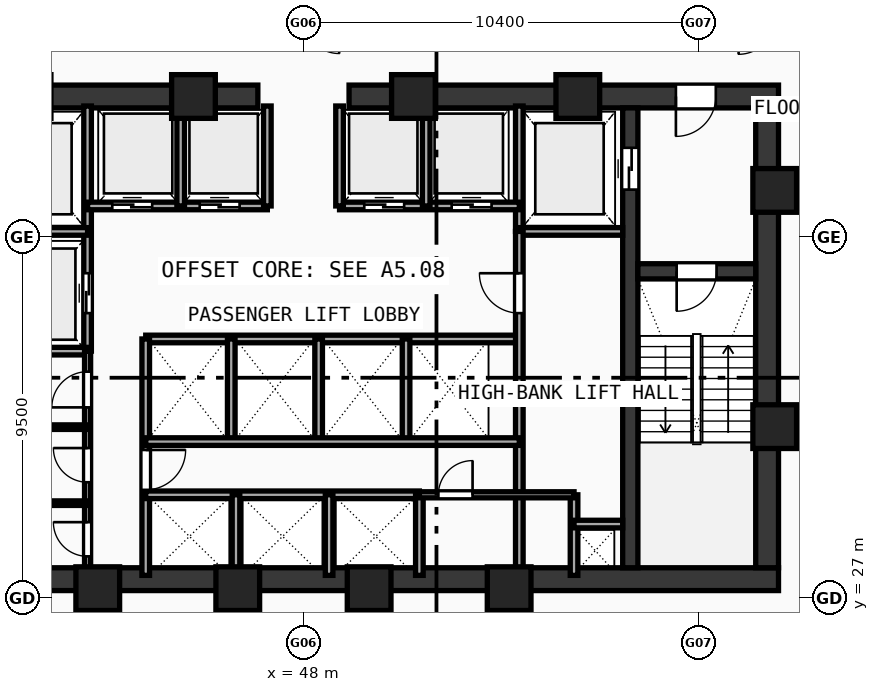
"""IFC4 building model, lengths in metres.
Left out: names, types, materials, properties, quantities, classifications, styles, units other than length and angle.
Written with IfcOpenShell. Run it as: python <this file> out.ifc"""

import sys

from ifc_helpers import new_model, si_unit, direction, frame, frame_2d, origin, origin_with_axes, origin_2d, place, context, subcontext, project, spatial, rectangle, hollow_rectangle, extrude, source, transform, mapped, element, fill, save


model = new_model("IFC4")
c1 = context("Model", 3, precision=1e-05, world=origin(), true_north=direction((0.0, 1.0)))
c2 = subcontext(c1, "Body", "Model", "MODEL_VIEW")
j1 = project(units=[si_unit("LENGTHUNIT", "METRE"), si_unit("PLANEANGLEUNIT", "RADIAN")], contexts=[c1])
p1 = place(None, origin())
s1 = spatial("IfcSite", under=j1, at=p1, CompositionType="ELEMENT")
p2 = place(p1, origin())
s2 = spatial("IfcBuilding", under=s1, at=p2, CompositionType="ELEMENT")
p3 = place(p2, frame((0.0, 0.0, 103.98)))
s3 = spatial("IfcBuildingStorey", under=s2, at=p3, CompositionType="ELEMENT", Elevation=103.98)
p4 = place(p3, frame((35.5, 27.5, 0.0), z_axis=(0.0, 0.0, 1.0), x_axis=(1.0, 0.0, 0.0)))
e1 = element("IfcWall", 1, at=p4, inside=s3, PredefinedType="SHEAR", context=c2, shape_type="SweptSolid", body=[
    extrude(rectangle(XDim=25.0, YDim=0.6, at=frame_2d((12.5, 0.0))), origin(), (0.0, 0.0, 1.0), 3.54),
])
p5 = place(p3, frame((35.5, 40.2, 0.0), z_axis=(0.0, 0.0, 1.0), x_axis=(1.0, 0.0, 0.0)))
e2 = element("IfcWall", 2, at=p5, inside=s3, PredefinedType="SHEAR", context=c2, shape_type="SweptSolid", body=[
    extrude(rectangle(XDim=11.3, YDim=0.6, at=frame_2d((5.65, 0.0))), origin(), (0.0, 0.0, 1.0), 3.54),
])
p6 = place(p5, frame((1.65, 0.0, 0.0)))
e3 = element("IfcOpeningElement", 3, at=p6, cuts=e2, PredefinedType="OPENING", context=c2, shape_type="SweptSolid", body=[
    extrude(rectangle(XDim=1.05, YDim=2.1, at=frame_2d((0.525, 1.05))), frame((0.0, 0.31, 0.0), z_axis=(0.0, -1.0, 0.0), x_axis=(1.0, 0.0, 0.0)), (0.0, 0.0, 1.0), 0.62),
])
p7 = place(p3, frame((49.2, 40.2, 0.0), z_axis=(0.0, 0.0, 1.0), x_axis=(1.0, 0.0, 0.0)))
e4 = element("IfcWall", 4, at=p7, inside=s3, PredefinedType="SHEAR", context=c2, shape_type="SweptSolid", body=[
    extrude(rectangle(XDim=11.3, YDim=0.6, at=frame_2d((5.65, 0.0))), origin(), (0.0, 0.0, 1.0), 3.54),
])
p8 = place(p7, frame((8.6, 0.0, 0.0)))
e5 = element("IfcOpeningElement", 5, at=p8, cuts=e4, PredefinedType="OPENING", context=c2, shape_type="SweptSolid", body=[
    extrude(rectangle(XDim=1.05, YDim=2.1, at=frame_2d((0.525, 1.05))), frame((0.0, 0.31, 0.0), z_axis=(0.0, -1.0, 0.0), x_axis=(1.0, 0.0, 0.0)), (0.0, 0.0, 1.0), 0.62),
])
p9 = place(p3, frame((60.2, 27.8, 0.0), z_axis=(0.0, 0.0, 1.0), x_axis=(0.0, 1.0, 0.0)))
e6 = element("IfcWall", 6, at=p9, inside=s3, PredefinedType="SHEAR", context=c2, shape_type="SweptSolid", body=[
    extrude(rectangle(XDim=12.1, YDim=0.6, at=frame_2d((6.05, 0.0))), origin(), (0.0, 0.0, 1.0), 3.54),
])
p10 = place(p3, frame((56.6, 27.8, 0.0), z_axis=(0.0, 0.0, 1.0), x_axis=(0.0, 1.0, 0.0)))
e7 = element("IfcWall", 7, at=p10, inside=s3, PredefinedType="SHEAR", context=c2, shape_type="SweptSolid", body=[
    extrude(rectangle(XDim=12.1, YDim=0.4, at=frame_2d((6.05, 0.0))), origin(), (0.0, 0.0, 1.0), 3.54),
])
p11 = place(p10, frame((9.95, 0.0, 0.0)))
e8 = element("IfcOpeningElement", 8, at=p11, cuts=e7, PredefinedType="OPENING", context=c2, shape_type="SweptSolid", body=[
    extrude(rectangle(XDim=1.1, YDim=2.1, at=frame_2d((0.55, 1.05))), frame((0.0, 0.21, 0.0), z_axis=(0.0, -1.0, 0.0), x_axis=(1.0, 0.0, 0.0)), (0.0, 0.0, 1.0), 0.42),
])
p12 = place(p3, frame((56.8, 35.6, 0.0), z_axis=(0.0, 0.0, 1.0), x_axis=(1.0, 0.0, 0.0)))
e9 = element("IfcWall", 9, at=p12, inside=s3, PredefinedType="SHEAR", context=c2, shape_type="SweptSolid", body=[
    extrude(rectangle(XDim=3.1, YDim=0.4, at=frame_2d((1.55, 0.0))), origin(), (0.0, 0.0, 1.0), 3.54),
])
p13 = place(p12, frame((1.02, 0.0, 0.0)))
e10 = element("IfcOpeningElement", 10, at=p13, cuts=e9, PredefinedType="OPENING", context=c2, shape_type="SweptSolid", body=[
    extrude(rectangle(XDim=1.05, YDim=2.1, at=frame_2d((0.525, 1.05))), frame((0.0, 0.21, 0.0), z_axis=(0.0, -1.0, 0.0), x_axis=(1.0, 0.0, 0.0)), (0.0, 0.0, 1.0), 0.42),
])
m1 = source(origin(), c2, "Body", "SweptSolid", [
    extrude(hollow_rectangle(XDim=1.15, YDim=1.15, WallThickness=0.048, at=origin_2d()), origin(), (0.0, 0.0, 1.0), 3.8),
])
for number, where, z_axis, x_axis in (
    (11, (42.588, 27.25, -0.26), (0.0, 0.0, 1.0), (1.0, 0.0, 0.0)),
    (12, (46.272, 27.25, -0.26), (0.0, 0.0, 1.0), (1.0, 0.0, 0.0)),
    (13, (49.729, 27.25, -0.26), (0.0, 0.0, 1.0), (1.0, 0.0, 0.0)),
    (14, (53.412, 27.25, -0.26), (0.0, 0.0, 1.0), (1.0, 0.0, 0.0)),
    (15, (60.4, 31.513, -0.26), (0.0, 0.0, 1.0), (1.0, 0.0, 0.0)),
    (16, (60.4, 37.729, -0.26), (0.0, 0.0, 1.0), (1.0, 0.0, 0.0)),
    (17, (55.219, 40.2, -0.26), (0.0, 0.0, 1.0), (1.0, 0.0, 0.0)),
    (18, (50.894, 40.2, -0.26), (0.0, 0.0, 1.0), (1.0, 0.0, 0.0)),
    (19, (45.106, 40.2, -0.26), (0.0, 0.0, 1.0), (1.0, 0.0, 0.0)),
):
    element("IfcColumn", number, at=place(p3, frame(where, z_axis=z_axis, x_axis=x_axis)), inside=s3, PredefinedType="COLUMN", context=c2, shape_type="MappedRepresentation", body=[
        mapped(m1, transform((0.0, 0.0, 0.0), scale=1.0)),
    ])
p14 = place(p3, frame((42.32, 33.5, 0.0), z_axis=(0.0, 0.0, 1.0), x_axis=(0.0, 1.0, 0.0)))
e20 = element("IfcWall", 20, at=p14, inside=s3, PredefinedType="SOLIDWALL", context=c2, shape_type="SweptSolid", body=[
    extrude(rectangle(XDim=6.45, YDim=0.2, at=frame_2d((3.225, 0.0))), origin(), (0.0, 0.0, 1.0), 3.54),
])
p15 = place(p14, frame((1.0, 0.0, 0.0)))
e21 = element("IfcOpeningElement", 21, at=p15, cuts=e20, PredefinedType="OPENING", context=c2, shape_type="SweptSolid", body=[
    extrude(rectangle(XDim=1.05, YDim=2.1, at=frame_2d((0.525, 1.05))), frame((0.0, 0.11, 0.0), z_axis=(0.0, -1.0, 0.0), x_axis=(1.0, 0.0, 0.0)), (0.0, 0.0, 1.0), 0.22),
])
for number, where, z_axis, x_axis in (
    (22, (39.6, 36.65, 0.0), (0.0, 0.0, 1.0), (1.0, 0.0, 0.0)),
    (23, (39.6, 33.5, 0.0), (0.0, 0.0, 1.0), (1.0, 0.0, 0.0)),
):
    element("IfcWall", number, at=place(p3, frame(where, z_axis=z_axis, x_axis=x_axis)), inside=s3, PredefinedType="SOLIDWALL", context=c2, shape_type="SweptSolid", body=[
        extrude(rectangle(XDim=2.72, YDim=0.2, at=frame_2d((1.36, 0.0))), origin(), (0.0, 0.0, 1.0), 3.54),
    ])
p16 = place(p3, frame((53.68, 36.65, 0.0), z_axis=(0.0, 0.0, 1.0), x_axis=(0.0, 1.0, 0.0)))
e24 = element("IfcWall", 24, at=p16, inside=s3, PredefinedType="SOLIDWALL", context=c2, shape_type="SweptSolid", body=[
    extrude(rectangle(XDim=3.3, YDim=0.2, at=frame_2d((1.65, 0.0))), origin(), (0.0, 0.0, 1.0), 3.54),
])
p17 = place(p3, frame((53.68, 36.65, 0.0), z_axis=(0.0, 0.0, 1.0), x_axis=(1.0, 0.0, 0.0)))
e25 = element("IfcWall", 25, at=p17, inside=s3, PredefinedType="SOLIDWALL", context=c2, shape_type="SweptSolid", body=[
    extrude(rectangle(XDim=2.72, YDim=0.2, at=frame_2d((1.36, 0.0))), origin(), (0.0, 0.0, 1.0), 3.54),
])
p18 = place(p3, frame((42.32, 37.32, 0.0), z_axis=(0.0, 0.0, 1.0), x_axis=(1.0, 0.0, 0.0)))
e26 = element("IfcWall", 26, at=p18, inside=s3, PredefinedType="SOLIDWALL", context=c2, shape_type="SweptSolid", body=[
    extrude(rectangle(XDim=4.73, YDim=0.2, at=frame_2d((2.365, 0.0))), origin(), (0.0, 0.0, 1.0), 3.54),
])
p19 = place(p18, frame((0.65, 0.0, 0.0)))
e27 = element("IfcOpeningElement", 27, at=p19, cuts=e26, PredefinedType="OPENING", context=c2, shape_type="SweptSolid", body=[
    extrude(rectangle(XDim=1.05, YDim=2.1, at=frame_2d((0.525, 1.05))), frame((0.0, 0.11, 0.0), z_axis=(0.0, -1.0, 0.0), x_axis=(1.0, 0.0, 0.0)), (0.0, 0.0, 1.0), 0.22),
])
p20 = place(p18, frame((2.95, 0.0, 0.0)))
e28 = element("IfcOpeningElement", 28, at=p20, cuts=e26, PredefinedType="OPENING", context=c2, shape_type="SweptSolid", body=[
    extrude(rectangle(XDim=1.05, YDim=2.1, at=frame_2d((0.525, 1.05))), frame((0.0, 0.11, 0.0), z_axis=(0.0, -1.0, 0.0), x_axis=(1.0, 0.0, 0.0)), (0.0, 0.0, 1.0), 0.22),
])
p21 = place(p3, frame((48.95, 37.32, 0.0), z_axis=(0.0, 0.0, 1.0), x_axis=(1.0, 0.0, 0.0)))
e29 = element("IfcWall", 29, at=p21, inside=s3, PredefinedType="SOLIDWALL", context=c2, shape_type="SweptSolid", body=[
    extrude(rectangle(XDim=4.73, YDim=0.2, at=frame_2d((2.365, 0.0))), origin(), (0.0, 0.0, 1.0), 3.54),
])
p22 = place(p21, frame((0.65, 0.0, 0.0)))
e30 = element("IfcOpeningElement", 30, at=p22, cuts=e29, PredefinedType="OPENING", context=c2, shape_type="SweptSolid", body=[
    extrude(rectangle(XDim=1.05, YDim=2.1, at=frame_2d((0.525, 1.05))), frame((0.0, 0.11, 0.0), z_axis=(0.0, -1.0, 0.0), x_axis=(1.0, 0.0, 0.0)), (0.0, 0.0, 1.0), 0.22),
])
p23 = place(p21, frame((2.95, 0.0, 0.0)))
e31 = element("IfcOpeningElement", 31, at=p23, cuts=e29, PredefinedType="OPENING", context=c2, shape_type="SweptSolid", body=[
    extrude(rectangle(XDim=1.05, YDim=2.1, at=frame_2d((0.525, 1.05))), frame((0.0, 0.11, 0.0), z_axis=(0.0, -1.0, 0.0), x_axis=(1.0, 0.0, 0.0)), (0.0, 0.0, 1.0), 0.22),
])
for number, where, z_axis, x_axis in (
    (32, (47.05, 37.32, 0.0), (0.0, 0.0, 1.0), (0.0, 1.0, 0.0)),
    (33, (48.95, 37.32, 0.0), (0.0, 0.0, 1.0), (0.0, 1.0, 0.0)),
    (34, (44.77, 37.32, 0.0), (0.0, 0.0, 1.0), (0.0, 1.0, 0.0)),
    (35, (51.23, 37.32, 0.0), (0.0, 0.0, 1.0), (0.0, 1.0, 0.0)),
):
    element("IfcWall", number, at=place(p3, frame(where, z_axis=z_axis, x_axis=x_axis)), inside=s3, PredefinedType="SOLIDWALL", context=c2, shape_type="SweptSolid", body=[
        extrude(rectangle(XDim=2.63, YDim=0.2, at=frame_2d((1.315, 0.0))), origin(), (0.0, 0.0, 1.0), 3.54),
    ])
p24 = place(p3, frame((43.85, 33.82, 0.0), z_axis=(0.0, 0.0, 1.0), x_axis=(1.0, 0.0, 0.0)))
e36 = element("IfcWall", 36, at=p24, inside=s3, PredefinedType="SOLIDWALL", context=c2, shape_type="SweptSolid", body=[
    extrude(rectangle(XDim=9.83, YDim=0.2, at=frame_2d((4.915, 0.0))), origin(), (0.0, 0.0, 1.0), 3.54),
])
p25 = place(p3, frame((43.85, 27.6, 0.0), z_axis=(0.0, 0.0, 1.0), x_axis=(0.0, 1.0, 0.0)))
e37 = element("IfcWall", 37, at=p25, inside=s3, PredefinedType="SOLIDWALL", context=c2, shape_type="SweptSolid", body=[
    extrude(rectangle(XDim=6.22, YDim=0.2, at=frame_2d((3.11, 0.0))), origin(), (0.0, 0.0, 1.0), 3.54),
])
p26 = place(p25, frame((2.25, 0.0, 0.0)))
e38 = element("IfcOpeningElement", 38, at=p26, cuts=e37, PredefinedType="OPENING", context=c2, shape_type="SweptSolid", body=[
    extrude(rectangle(XDim=1.05, YDim=2.1, at=frame_2d((0.525, 1.05))), frame((0.0, 0.11, 0.0), z_axis=(0.0, -1.0, 0.0), x_axis=(1.0, 0.0, 0.0)), (0.0, 0.0, 1.0), 0.22),
])
p27 = place(p3, frame((53.68, 27.6, 0.0), z_axis=(0.0, 0.0, 1.0), x_axis=(0.0, 1.0, 0.0)))
e39 = element("IfcWall", 39, at=p27, inside=s3, PredefinedType="SOLIDWALL", context=c2, shape_type="SweptSolid", body=[
    extrude(rectangle(XDim=9.05, YDim=0.2, at=frame_2d((4.525, 0.0))), origin(), (0.0, 0.0, 1.0), 3.54),
])
p28 = place(p27, frame((6.9, 0.0, 0.0)))
e40 = element("IfcOpeningElement", 40, at=p28, cuts=e39, PredefinedType="OPENING", context=c2, shape_type="SweptSolid", body=[
    extrude(rectangle(XDim=1.05, YDim=2.1, at=frame_2d((0.525, 1.05))), frame((0.0, 0.11, 0.0), z_axis=(0.0, -1.0, 0.0), x_axis=(1.0, 0.0, 0.0)), (0.0, 0.0, 1.0), 0.22),
])
for number, where, z_axis, x_axis in (
    (41, (46.1, 31.12, 0.0), (0.0, 0.0, 1.0), (0.0, 1.0, 0.0)),
    (42, (48.4, 31.12, 0.0), (0.0, 0.0, 1.0), (0.0, 1.0, 0.0)),
    (43, (50.7, 31.12, 0.0), (0.0, 0.0, 1.0), (0.0, 1.0, 0.0)),
):
    element("IfcWall", number, at=place(p3, frame(where, z_axis=z_axis, x_axis=x_axis)), inside=s3, PredefinedType="SOLIDWALL", context=c2, shape_type="SweptSolid", body=[
        extrude(rectangle(XDim=2.7, YDim=0.2, at=frame_2d((1.35, 0.0))), origin(), (0.0, 0.0, 1.0), 3.54),
    ])
p29 = place(p3, frame((43.85, 29.72, 0.0), z_axis=(0.0, 0.0, 1.0), x_axis=(1.0, 0.0, 0.0)))
e44 = element("IfcWall", 44, at=p29, inside=s3, PredefinedType="SOLIDWALL", context=c2, shape_type="SweptSolid", body=[
    extrude(rectangle(XDim=7.2, YDim=0.2, at=frame_2d((3.6, 0.0))), origin(), (0.0, 0.0, 1.0), 3.54),
])
p30 = place(p3, frame((51.05, 27.6, 0.0), z_axis=(0.0, 0.0, 1.0), x_axis=(0.0, 1.0, 0.0)))
e45 = element("IfcWall", 45, at=p30, inside=s3, PredefinedType="SOLIDWALL", context=c2, shape_type="SweptSolid", body=[
    extrude(rectangle(XDim=2.12, YDim=0.2, at=frame_2d((1.06, 0.0))), origin(), (0.0, 0.0, 1.0), 3.54),
])
p31 = place(p3, frame((43.85, 31.12, 0.0), z_axis=(0.0, 0.0, 1.0), x_axis=(1.0, 0.0, 0.0)))
e46 = element("IfcWall", 46, at=p31, inside=s3, PredefinedType="SOLIDWALL", context=c2, shape_type="SweptSolid", body=[
    extrude(rectangle(XDim=9.83, YDim=0.2, at=frame_2d((4.915, 0.0))), origin(), (0.0, 0.0, 1.0), 3.54),
])
for number, where, z_axis, x_axis in (
    (47, (46.225, 27.6, 0.0), (0.0, 0.0, 1.0), (0.0, 1.0, 0.0)),
    (48, (48.675, 27.6, 0.0), (0.0, 0.0, 1.0), (0.0, 1.0, 0.0)),
    (49, (55.12, 27.6, 0.0), (0.0, 0.0, 1.0), (0.0, 1.0, 0.0)),
):
    element("IfcWall", number, at=place(p3, frame(where, z_axis=z_axis, x_axis=x_axis)), inside=s3, PredefinedType="SOLIDWALL", context=c2, shape_type="SweptSolid", body=[
        extrude(rectangle(XDim=2.12, YDim=0.2, at=frame_2d((1.06, 0.0))), origin(), (0.0, 0.0, 1.0), 3.54),
    ])
p32 = place(p3, frame((55.12, 28.95, 0.0), z_axis=(0.0, 0.0, 1.0), x_axis=(1.0, 0.0, 0.0)))
e50 = element("IfcWall", 50, at=p32, inside=s3, PredefinedType="SOLIDWALL", context=c2, shape_type="SweptSolid", body=[
    extrude(rectangle(XDim=1.28, YDim=0.2, at=frame_2d((0.64, 0.0))), origin(), (0.0, 0.0, 1.0), 3.54),
])
p33 = place(p3, frame((42.32, 27.6, 0.0), z_axis=(0.0, 0.0, 1.0), x_axis=(0.0, 1.0, 0.0)))
e51 = element("IfcWall", 51, at=p33, inside=s3, PredefinedType="PARTITIONING", context=c2, shape_type="SweptSolid", body=[
    extrude(rectangle(XDim=5.9, YDim=0.16, at=frame_2d((2.95, 0.0))), origin(), (0.0, 0.0, 1.0), 3.54),
])
p34 = place(p33, frame((0.5, 0.0, 0.0)))
e52 = element("IfcOpeningElement", 52, at=p34, cuts=e51, PredefinedType="OPENING", context=c2, shape_type="SweptSolid", body=[
    extrude(rectangle(XDim=0.9, YDim=2.1, at=frame_2d((0.45, 1.05))), frame((0.0, 0.09, 0.0), z_axis=(0.0, -1.0, 0.0), x_axis=(1.0, 0.0, 0.0)), (0.0, 0.0, 1.0), 0.18),
])
p35 = place(p33, frame((2.45, 0.0, 0.0)))
e53 = element("IfcOpeningElement", 53, at=p35, cuts=e51, PredefinedType="OPENING", context=c2, shape_type="SweptSolid", body=[
    extrude(rectangle(XDim=0.9, YDim=2.1, at=frame_2d((0.45, 1.05))), frame((0.0, 0.09, 0.0), z_axis=(0.0, -1.0, 0.0), x_axis=(1.0, 0.0, 0.0)), (0.0, 0.0, 1.0), 0.18),
])
p36 = place(p33, frame((4.42, 0.0, 0.0)))
e54 = element("IfcOpeningElement", 54, at=p36, cuts=e51, PredefinedType="OPENING", context=c2, shape_type="SweptSolid", body=[
    extrude(rectangle(XDim=0.94, YDim=2.1, at=frame_2d((0.47, 1.05))), frame((0.0, 0.09, 0.0), z_axis=(0.0, -1.0, 0.0), x_axis=(1.0, 0.0, 0.0)), (0.0, 0.0, 1.0), 0.18),
])
p37 = place(p3, frame((51.05, 29.72, 0.0), z_axis=(0.0, 0.0, 1.0), x_axis=(1.0, 0.0, 0.0)))
e55 = element("IfcWall", 55, at=p37, inside=s3, PredefinedType="PARTITIONING", context=c2, shape_type="SweptSolid", body=[
    extrude(rectangle(XDim=4.07, YDim=0.16, at=frame_2d((2.035, 0.0))), origin(), (0.0, 0.0, 1.0), 3.54),
])
p38 = place(p37, frame((0.5, 0.0, 0.0)))
e56 = element("IfcOpeningElement", 56, at=p38, cuts=e55, PredefinedType="OPENING", context=c2, shape_type="SweptSolid", body=[
    extrude(rectangle(XDim=0.9, YDim=2.1, at=frame_2d((0.45, 1.05))), frame((0.0, 0.09, 0.0), z_axis=(0.0, -1.0, 0.0), x_axis=(1.0, 0.0, 0.0)), (0.0, 0.0, 1.0), 0.18),
])
for number, where, z_axis, x_axis in (
    (57, (39.6, 29.5, 0.0), (0.0, 0.0, 1.0), (1.0, 0.0, 0.0)),
    (58, (39.6, 31.5, 0.0), (0.0, 0.0, 1.0), (1.0, 0.0, 0.0)),
):
    element("IfcWall", number, at=place(p3, frame(where, z_axis=z_axis, x_axis=x_axis)), inside=s3, PredefinedType="PARTITIONING", context=c2, shape_type="SweptSolid", body=[
        extrude(rectangle(XDim=2.72, YDim=0.12, at=frame_2d((1.36, 0.0))), origin(), (0.0, 0.0, 1.0), 3.54),
    ])
m2 = source(origin(), c2, "Body", "SweptSolid", [
    extrude(rectangle(XDim=1.05, YDim=2.1, at=frame_2d((0.525, 1.05))), frame((0.0, 0.025, 0.0), z_axis=(0.0, -1.0, 0.0), x_axis=(1.0, 0.0, 0.0)), (0.0, 0.0, 1.0), 0.05),
])
p39 = place(p13, frame((1.05, 0.0, 0.0), z_axis=(0.0, 0.0, 1.0), x_axis=(-1.0, 0.0, 0.0)))
e59 = element("IfcDoor", 59, at=p39, inside=s3, OperationType="SINGLE_SWING_RIGHT", PredefinedType="DOOR", context=c2, shape_type="MappedRepresentation", body=[
    mapped(m2, transform((0.0, 0.0, 0.0), scale=1.0)),
])
fill(e10, e59)
p40 = place(p8, frame((1.05, 0.0, 0.0), z_axis=(0.0, 0.0, 1.0), x_axis=(-1.0, 0.0, 0.0)))
e60 = element("IfcDoor", 60, at=p40, inside=s3, OperationType="SINGLE_SWING_RIGHT", PredefinedType="DOOR", context=c2, shape_type="MappedRepresentation", body=[
    mapped(m2, transform((0.0, 0.0, 0.0), scale=1.0)),
])
fill(e5, e60)
m3 = source(origin(), c2, "Body", "SweptSolid", [
    extrude(rectangle(XDim=1.1, YDim=2.1, at=frame_2d((0.55, 1.05))), frame((0.0, 0.025, 0.0), z_axis=(0.0, -1.0, 0.0), x_axis=(1.0, 0.0, 0.0)), (0.0, 0.0, 1.0), 0.05),
])
p41 = place(p11, origin_with_axes())
e61 = element("IfcDoor", 61, at=p41, inside=s3, OperationType="DOUBLE_DOOR_SLIDING", PredefinedType="DOOR", context=c2, shape_type="MappedRepresentation", body=[
    mapped(m3, transform((0.0, 0.0, 0.0), scale=1.0)),
])
fill(e8, e61)
p42 = place(p15, origin_with_axes())
e62 = element("IfcDoor", 62, at=p42, inside=s3, OperationType="DOUBLE_DOOR_SLIDING", PredefinedType="DOOR", context=c2, shape_type="MappedRepresentation", body=[
    mapped(m2, transform((0.0, 0.0, 0.0), scale=1.0)),
])
fill(e21, e62)
p43 = place(p19, frame((1.05, 0.0, 0.0), z_axis=(0.0, 0.0, 1.0), x_axis=(-1.0, 0.0, 0.0)))
e63 = element("IfcDoor", 63, at=p43, inside=s3, OperationType="DOUBLE_DOOR_SLIDING", PredefinedType="DOOR", context=c2, shape_type="MappedRepresentation", body=[
    mapped(m2, transform((0.0, 0.0, 0.0), scale=1.0)),
])
fill(e27, e63)
p44 = place(p20, frame((1.05, 0.0, 0.0), z_axis=(0.0, 0.0, 1.0), x_axis=(-1.0, 0.0, 0.0)))
e64 = element("IfcDoor", 64, at=p44, inside=s3, OperationType="DOUBLE_DOOR_SLIDING", PredefinedType="DOOR", context=c2, shape_type="MappedRepresentation", body=[
    mapped(m2, transform((0.0, 0.0, 0.0), scale=1.0)),
])
fill(e28, e64)
p45 = place(p22, frame((1.05, 0.0, 0.0), z_axis=(0.0, 0.0, 1.0), x_axis=(-1.0, 0.0, 0.0)))
e65 = element("IfcDoor", 65, at=p45, inside=s3, OperationType="DOUBLE_DOOR_SLIDING", PredefinedType="DOOR", context=c2, shape_type="MappedRepresentation", body=[
    mapped(m2, transform((0.0, 0.0, 0.0), scale=1.0)),
])
fill(e30, e65)
p46 = place(p23, frame((1.05, 0.0, 0.0), z_axis=(0.0, 0.0, 1.0), x_axis=(-1.0, 0.0, 0.0)))
e66 = element("IfcDoor", 66, at=p46, inside=s3, OperationType="DOUBLE_DOOR_SLIDING", PredefinedType="DOOR", context=c2, shape_type="MappedRepresentation", body=[
    mapped(m2, transform((0.0, 0.0, 0.0), scale=1.0)),
])
fill(e31, e66)
p47 = place(p26, frame((1.05, 0.0, 0.0), z_axis=(0.0, 0.0, 1.0), x_axis=(-1.0, 0.0, 0.0)))
e67 = element("IfcDoor", 67, at=p47, inside=s3, OperationType="SINGLE_SWING_LEFT", PredefinedType="DOOR", context=c2, shape_type="MappedRepresentation", body=[
    mapped(m2, transform((0.0, 0.0, 0.0), scale=1.0)),
])
fill(e38, e67)
p48 = place(p28, origin_with_axes())
e68 = element("IfcDoor", 68, at=p48, inside=s3, OperationType="SINGLE_SWING_RIGHT", PredefinedType="DOOR", context=c2, shape_type="MappedRepresentation", body=[
    mapped(m2, transform((0.0, 0.0, 0.0), scale=1.0)),
])
fill(e40, e68)
m4 = source(origin(), c2, "Body", "SweptSolid", [
    extrude(rectangle(XDim=0.9, YDim=2.1, at=frame_2d((0.45, 1.05))), frame((0.0, 0.025, 0.0), z_axis=(0.0, -1.0, 0.0), x_axis=(1.0, 0.0, 0.0)), (0.0, 0.0, 1.0), 0.05),
])
p49 = place(p34, origin_with_axes())
e69 = element("IfcDoor", 69, at=p49, inside=s3, OperationType="SINGLE_SWING_RIGHT", PredefinedType="DOOR", context=c2, shape_type="MappedRepresentation", body=[
    mapped(m4, transform((0.0, 0.0, 0.0), scale=1.0)),
])
fill(e52, e69)
p50 = place(p35, origin_with_axes())
e70 = element("IfcDoor", 70, at=p50, inside=s3, OperationType="SINGLE_SWING_RIGHT", PredefinedType="DOOR", context=c2, shape_type="MappedRepresentation", body=[
    mapped(m4, transform((0.0, 0.0, 0.0), scale=1.0)),
])
fill(e53, e70)
m5 = source(origin(), c2, "Body", "SweptSolid", [
    extrude(rectangle(XDim=0.94, YDim=2.1, at=frame_2d((0.47, 1.05))), frame((0.0, 0.025, 0.0), z_axis=(0.0, -1.0, 0.0), x_axis=(1.0, 0.0, 0.0)), (0.0, 0.0, 1.0), 0.05),
])
p51 = place(p36, origin_with_axes())
e71 = element("IfcDoor", 71, at=p51, inside=s3, OperationType="SINGLE_SWING_LEFT", PredefinedType="DOOR", context=c2, shape_type="MappedRepresentation", body=[
    mapped(m5, transform((0.0, 0.0, 0.0), scale=1.0)),
])
fill(e54, e71)
p52 = place(p38, origin_with_axes())
e72 = element("IfcDoor", 72, at=p52, inside=s3, OperationType="SINGLE_SWING_RIGHT", PredefinedType="DOOR", context=c2, shape_type="MappedRepresentation", body=[
    mapped(m4, transform((0.0, 0.0, 0.0), scale=1.0)),
])
fill(e56, e72)
save(model, sys.argv[1])
